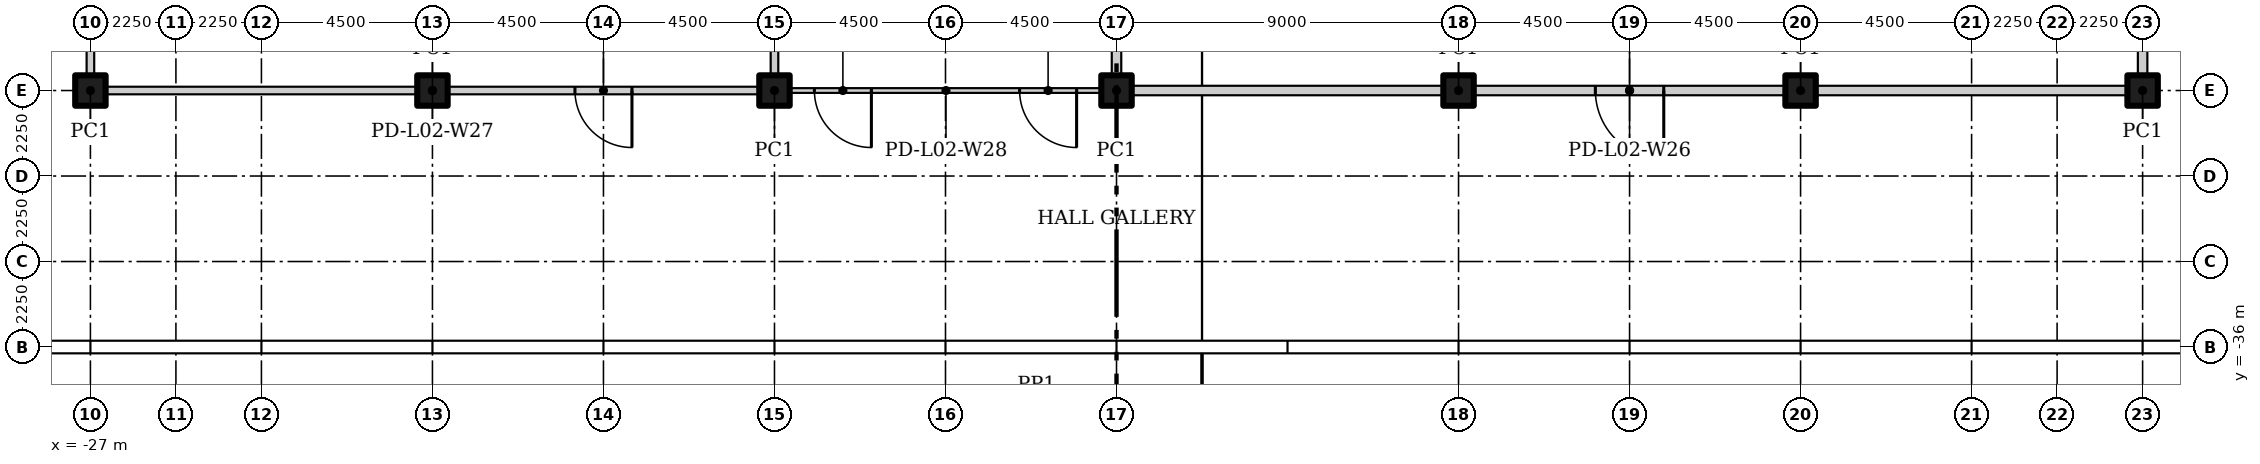
"""IFC4 building model, lengths in metres.
Left out: names, types, materials, properties, quantities, classifications, styles, units other than length and angle.
Written with IfcOpenShell. Run it as: python <this file> out.ifc"""

import sys

from ifc_helpers import new_model, si_unit, direction, frame, frame_2d, origin, origin_2d, place, context, subcontext, project, spatial, rectangle, hollow_rectangle, extrude, element, fill, save


model = new_model("IFC4")
c1 = context("Model", 3, precision=1e-05, world=origin(), true_north=direction((0.0, 1.0)))
c2 = subcontext(c1, "Body", "Model", "MODEL_VIEW")
j1 = project(units=[si_unit("LENGTHUNIT", "METRE"), si_unit("PLANEANGLEUNIT", "RADIAN")], contexts=[c1])
p1 = place(None, origin())
s1 = spatial("IfcSite", under=j1, at=p1, CompositionType="ELEMENT")
p2 = place(p1, origin())
s2 = spatial("IfcBuilding", under=s1, at=p2, CompositionType="ELEMENT")
p3 = place(p2, frame((0.0, 0.0, 12.5)))
s3 = spatial("IfcBuildingStorey", under=s2, at=p3, CompositionType="ELEMENT", Elevation=12.5)
for number, where in (
    (1, (-27.0, -29.25, 0.0)),
    (2, (-18.0, -29.25, 0.0)),
    (3, (-9.0, -29.25, 0.0)),
    (4, (0.0, -29.25, 0.0)),
    (5, (9.0, -29.25, 0.0)),
    (6, (18.0, -29.25, 0.0)),
    (7, (27.0, -29.25, 0.0)),
):
    element("IfcColumn", number, at=place(p3, frame(where)), inside=s3, PredefinedType="COLUMN", context=c2, shape_type="SweptSolid", body=[
        extrude(hollow_rectangle(XDim=0.8, YDim=0.8, WallThickness=0.03, at=origin_2d()), origin(), (0.0, 0.0, 1.0), 5.6),
    ])
p4 = place(p3, frame((-27.0, -29.15, 0.0), z_axis=(0.0, 0.0, 1.0), x_axis=(0.0, 1.0, 0.0)))
e8 = element("IfcWall", 8, at=p4, inside=s3, PredefinedType="PARTITIONING", context=c2, shape_type="SweptSolid", body=[
    extrude(rectangle(XDim=17.8, YDim=0.2, at=frame_2d((8.9, 0.0))), origin(), (0.0, 0.0, 1.0), 5.6),
])
p5 = place(p4, frame((3.05, 0.0, 0.0)))
e9 = element("IfcOpeningElement", 9, at=p5, cuts=e8, PredefinedType="OPENING", context=c2, shape_type="SweptSolid", body=[
    extrude(rectangle(XDim=1.5, YDim=2.1, at=frame_2d((0.75, 1.05))), frame((0.0, 0.11, 0.0), z_axis=(0.0, -1.0, 0.0), x_axis=(1.0, 0.0, 0.0)), (0.0, 0.0, 1.0), 0.22),
])
p6 = place(p4, frame((10.55, 0.0, 0.0)))
e10 = element("IfcOpeningElement", 10, at=p6, cuts=e8, PredefinedType="OPENING", context=c2, shape_type="SweptSolid", body=[
    extrude(rectangle(XDim=1.5, YDim=2.1, at=frame_2d((0.75, 1.05))), frame((0.0, 0.11, 0.0), z_axis=(0.0, -1.0, 0.0), x_axis=(1.0, 0.0, 0.0)), (0.0, 0.0, 1.0), 0.22),
])
p7 = place(p4, frame((15.95, 0.0, 0.0)))
e11 = element("IfcOpeningElement", 11, at=p7, cuts=e8, PredefinedType="OPENING", context=c2, shape_type="SweptSolid", body=[
    extrude(rectangle(XDim=1.5, YDim=2.1, at=frame_2d((0.75, 1.05))), frame((0.0, 0.11, 0.0), z_axis=(0.0, -1.0, 0.0), x_axis=(1.0, 0.0, 0.0)), (0.0, 0.0, 1.0), 0.22),
])
p8 = place(p3, frame((27.0, -20.375, 0.0), z_axis=(0.0, 0.0, 1.0), x_axis=(0.0, -1.0, 0.0)))
e12 = element("IfcWall", 12, at=p8, inside=s3, PredefinedType="PARTITIONING", context=c2, shape_type="SweptSolid", body=[
    extrude(rectangle(XDim=8.75, YDim=0.25, at=frame_2d((4.375, 0.0))), origin(), (0.0, 0.0, 1.0), 5.6),
])
p9 = place(p8, frame((4.225, 0.0, 0.0)))
e13 = element("IfcOpeningElement", 13, at=p9, cuts=e12, PredefinedType="OPENING", context=c2, shape_type="SweptSolid", body=[
    extrude(rectangle(XDim=1.8, YDim=2.4, at=frame_2d((0.9, 1.2))), frame((0.0, 0.135, 0.0), z_axis=(0.0, -1.0, 0.0), x_axis=(1.0, 0.0, 0.0)), (0.0, 0.0, 1.0), 0.27),
])
p10 = place(p3, frame((27.125, -29.25, 0.0), z_axis=(0.0, 0.0, 1.0), x_axis=(-1.0, 0.0, 0.0)))
e14 = element("IfcWall", 14, at=p10, inside=s3, PredefinedType="PARTITIONING", context=c2, shape_type="SweptSolid", body=[
    extrude(rectangle(XDim=27.25, YDim=0.25, at=frame_2d((13.625, 0.0))), origin(), (0.0, 0.0, 1.0), 5.6),
])
p11 = place(p10, frame((12.725, 0.0, 0.0)))
e15 = element("IfcOpeningElement", 15, at=p11, cuts=e14, PredefinedType="OPENING", context=c2, shape_type="SweptSolid", body=[
    extrude(rectangle(XDim=1.8, YDim=2.4, at=frame_2d((0.9, 1.2))), frame((0.0, 0.135, 0.0), z_axis=(0.0, -1.0, 0.0), x_axis=(1.0, 0.0, 0.0)), (0.0, 0.0, 1.0), 0.27),
])
p12 = place(p3, frame((-8.9, -29.25, 0.0), z_axis=(0.0, 0.0, 1.0), x_axis=(-1.0, 0.0, 0.0)))
e16 = element("IfcWall", 16, at=p12, inside=s3, PredefinedType="PARTITIONING", context=c2, shape_type="SweptSolid", body=[
    extrude(rectangle(XDim=18.2, YDim=0.2, at=frame_2d((9.1, 0.0))), origin(), (0.0, 0.0, 1.0), 5.6),
])
p13 = place(p12, frame((3.85, 0.0, 0.0)))
e17 = element("IfcOpeningElement", 17, at=p13, cuts=e16, PredefinedType="OPENING", context=c2, shape_type="SweptSolid", body=[
    extrude(rectangle(XDim=1.5, YDim=2.1, at=frame_2d((0.75, 1.05))), frame((0.0, 0.11, 0.0), z_axis=(0.0, -1.0, 0.0), x_axis=(1.0, 0.0, 0.0)), (0.0, 0.0, 1.0), 0.22),
])
p14 = place(p3, frame((0.125, -29.25, 0.0), z_axis=(0.0, 0.0, 1.0), x_axis=(-1.0, 0.0, 0.0)))
e18 = element("IfcWall", 18, at=p14, inside=s3, PredefinedType="PARTITIONING", context=c2, shape_type="SweptSolid", body=[
    extrude(rectangle(XDim=9.225, YDim=0.125, at=frame_2d((4.613, 0.0))), origin(), (0.0, 0.0, 1.0), 5.6),
])
p15 = place(p14, frame((1.175, 0.0, 0.0)))
e19 = element("IfcOpeningElement", 19, at=p15, cuts=e18, PredefinedType="OPENING", context=c2, shape_type="SweptSolid", body=[
    extrude(rectangle(XDim=1.5, YDim=2.1, at=frame_2d((0.75, 1.05))), frame((0.0, 0.073, 0.0), z_axis=(0.0, -1.0, 0.0), x_axis=(1.0, 0.0, 0.0)), (0.0, 0.0, 1.0), 0.145),
])
p16 = place(p14, frame((6.575, 0.0, 0.0)))
e20 = element("IfcOpeningElement", 20, at=p16, cuts=e18, PredefinedType="OPENING", context=c2, shape_type="SweptSolid", body=[
    extrude(rectangle(XDim=1.5, YDim=2.1, at=frame_2d((0.75, 1.05))), frame((0.0, 0.073, 0.0), z_axis=(0.0, -1.0, 0.0), x_axis=(1.0, 0.0, 0.0)), (0.0, 0.0, 1.0), 0.145),
])
p17 = place(p3, frame((0.0, -11.375, 0.0), z_axis=(0.0, 0.0, 1.0), x_axis=(0.0, -1.0, 0.0)))
e21 = element("IfcWall", 21, at=p17, inside=s3, PredefinedType="PARTITIONING", context=c2, shape_type="SweptSolid", body=[
    extrude(rectangle(XDim=17.75, YDim=0.25, at=frame_2d((8.875, 0.0))), origin(), (0.0, 0.0, 1.0), 5.6),
])
p18 = place(p3, frame((-9.0, -29.15, 0.0), z_axis=(0.0, 0.0, 1.0), x_axis=(0.0, 1.0, 0.0)))
e22 = element("IfcWall", 22, at=p18, inside=s3, PredefinedType="PARTITIONING", context=c2, shape_type="SweptSolid", body=[
    extrude(rectangle(XDim=22.3, YDim=0.2, at=frame_2d((11.15, 0.0))), origin(), (0.0, 0.0, 1.0), 5.6),
])
p19 = place(p13, origin())
e23 = element("IfcDoor", 23, at=p19, inside=s3, OperationType="DOUBLE_DOOR_SINGLE_SWING", PredefinedType="DOOR", context=c2, shape_type="SweptSolid", body=[
    extrude(rectangle(XDim=1.5, YDim=2.1, at=frame_2d((0.75, 1.05))), frame((0.0, 0.025, 0.0), z_axis=(0.0, -1.0, 0.0), x_axis=(1.0, 0.0, 0.0)), (0.0, 0.0, 1.0), 0.05),
])
fill(e17, e23)
p20 = place(p15, origin())
e24 = element("IfcDoor", 24, at=p20, inside=s3, OperationType="DOUBLE_DOOR_SINGLE_SWING", PredefinedType="DOOR", context=c2, shape_type="SweptSolid", body=[
    extrude(rectangle(XDim=1.5, YDim=2.1, at=frame_2d((0.75, 1.05))), frame((0.0, 0.025, 0.0), z_axis=(0.0, -1.0, 0.0), x_axis=(1.0, 0.0, 0.0)), (0.0, 0.0, 1.0), 0.05),
])
fill(e19, e24)
p21 = place(p16, origin())
e25 = element("IfcDoor", 25, at=p21, inside=s3, OperationType="DOUBLE_DOOR_SINGLE_SWING", PredefinedType="DOOR", context=c2, shape_type="SweptSolid", body=[
    extrude(rectangle(XDim=1.5, YDim=2.1, at=frame_2d((0.75, 1.05))), frame((0.0, 0.025, 0.0), z_axis=(0.0, -1.0, 0.0), x_axis=(1.0, 0.0, 0.0)), (0.0, 0.0, 1.0), 0.05),
])
fill(e20, e25)
p22 = place(p11, origin())
e26 = element("IfcDoor", 26, at=p22, inside=s3, OperationType="DOUBLE_DOOR_SINGLE_SWING", PredefinedType="DOOR", context=c2, shape_type="SweptSolid", body=[
    extrude(rectangle(XDim=1.8, YDim=2.4, at=frame_2d((0.9, 1.2))), frame((0.0, 0.025, 0.0), z_axis=(0.0, -1.0, 0.0), x_axis=(1.0, 0.0, 0.0)), (0.0, 0.0, 1.0), 0.05),
])
fill(e15, e26)
save(model, sys.argv[1])
